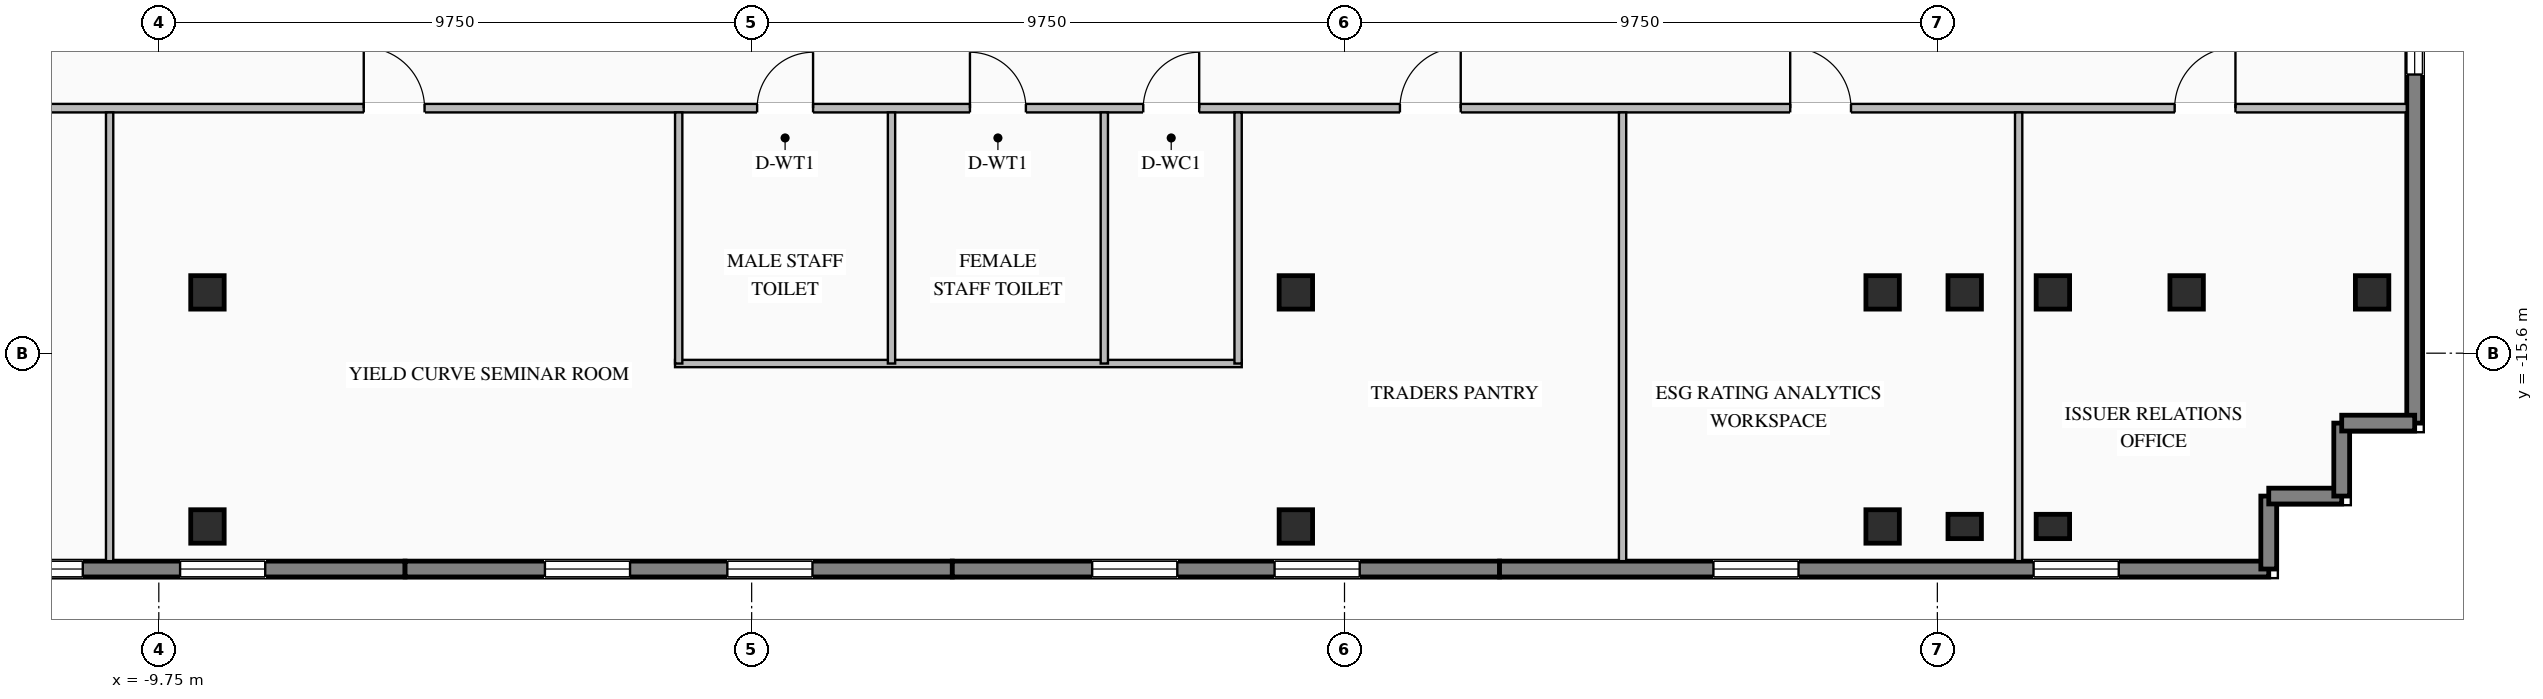
"""IFC4 building model, lengths in metres.
Left out: names, types, materials, properties, quantities, classifications, styles, units other than length and angle.
Written with IfcOpenShell. Run it as: python <this file> out.ifc"""

import sys

from ifc_helpers import new_model, si_unit, direction, frame, frame_2d, origin, origin_2d, place, context, subcontext, project, spatial, rectangle, i_section, extrude, element, fill, save


model = new_model("IFC4")
c1 = context("Model", 3, precision=1e-05, world=origin(), true_north=direction((0.0, 1.0)))
c2 = subcontext(c1, "Body", "Model", "MODEL_VIEW")
j1 = project(units=[si_unit("LENGTHUNIT", "METRE"), si_unit("PLANEANGLEUNIT", "RADIAN")], contexts=[c1])
p1 = place(None, origin())
s1 = spatial("IfcSite", under=j1, at=p1, CompositionType="ELEMENT")
p2 = place(p1, origin())
s2 = spatial("IfcBuilding", under=s1, at=p2, CompositionType="ELEMENT")
p3 = place(p2, frame((0.0, 0.0, 236.1)))
s3 = spatial("IfcBuildingStorey", under=s2, at=p3, CompositionType="ELEMENT", Elevation=236.1)
for number, where, z_axis, x_axis in (
    (1, (-8.95, -14.6, 0.0), (0.0, 0.0, 1.0), (1.0, 0.0, 0.0)),
    (2, (8.95, -14.6, 0.0), (0.0, 0.0, 1.0), (1.0, 0.0, 0.0)),
    (3, (18.6, -14.6, 0.0), (0.0, 0.0, 1.0), (1.0, 0.0, 0.0)),
    (4, (19.95, -14.6, 0.0), (0.0, 0.0, 1.0), (1.0, 0.0, 0.0)),
    (5, (21.4, -14.6, 0.0), (0.0, 0.0, 1.0), (1.0, 0.0, 0.0)),
    (6, (23.6, -14.6, 0.0), (0.0, 0.0, 1.0), (1.0, 0.0, 0.0)),
    (7, (-8.95, -18.45, 0.0), (0.0, 0.0, 1.0), (1.0, 0.0, 0.0)),
    (8, (8.95, -18.45, 0.0), (0.0, 0.0, 1.0), (1.0, 0.0, 0.0)),
    (9, (18.6, -18.45, 0.0), (0.0, 0.0, 1.0), (1.0, 0.0, 0.0)),
    (10, (26.65, -14.6, 0.0), (0.0, 0.0, 1.0), (1.0, 0.0, 0.0)),
):
    element("IfcColumn", number, at=place(p3, frame(where, z_axis=z_axis, x_axis=x_axis)), inside=s3, PredefinedType="COLUMN", context=c2, shape_type="SweptSolid", body=[
        extrude(i_section(OverallWidth=0.55, OverallDepth=0.55, WebThickness=0.024, FlangeThickness=0.036, at=origin_2d()), origin(), (0.0, 0.0, 1.0), 3.45),
    ])
for number, where, z_axis, x_axis in (
    (11, (19.95, -18.45, 0.0), (0.0, 0.0, 1.0), (1.0, 0.0, 0.0)),
    (12, (21.4, -18.45, 0.0), (0.0, 0.0, 1.0), (1.0, 0.0, 0.0)),
):
    element("IfcColumn", number, at=place(p3, frame(where, z_axis=z_axis, x_axis=x_axis)), inside=s3, PredefinedType="PILASTER", context=c2, shape_type="SweptSolid", body=[
        extrude(rectangle(XDim=0.55, YDim=0.4, at=origin_2d()), origin(), (0.0, 0.0, 1.0), 3.45),
    ])
p4 = place(p3, frame((-5.7, -19.15, 0.0), z_axis=(0.0, 0.0, 1.0), x_axis=(-1.0, 0.0, 0.0)))
e13 = element("IfcWall", 13, at=p4, inside=s3, PredefinedType="STANDARD", context=c2, shape_type="SweptSolid", body=[
    extrude(rectangle(XDim=9.0, YDim=0.26, at=frame_2d((4.5, 0.0))), origin(), (0.0, 0.0, 1.0), 3.25),
])
p5 = place(p4, frame((2.3, 0.0, 0.76)))
e14 = element("IfcOpeningElement", 14, at=p5, cuts=e13, PredefinedType="OPENING", context=c2, shape_type="SweptSolid", body=[
    extrude(rectangle(XDim=1.4, YDim=1.95, at=frame_2d((0.7, 0.975))), frame((0.0, 0.14, 0.0), z_axis=(0.0, -1.0, 0.0), x_axis=(1.0, 0.0, 0.0)), (0.0, 0.0, 1.0), 0.28),
])
p6 = place(p4, frame((5.3, 0.0, 0.76)))
e15 = element("IfcOpeningElement", 15, at=p6, cuts=e13, PredefinedType="OPENING", context=c2, shape_type="SweptSolid", body=[
    extrude(rectangle(XDim=1.4, YDim=1.95, at=frame_2d((0.7, 0.975))), frame((0.0, 0.14, 0.0), z_axis=(0.0, -1.0, 0.0), x_axis=(1.0, 0.0, 0.0)), (0.0, 0.0, 1.0), 0.28),
])
p7 = place(p3, frame((3.3, -19.15, 0.0), z_axis=(0.0, 0.0, 1.0), x_axis=(-1.0, 0.0, 0.0)))
e16 = element("IfcWall", 16, at=p7, inside=s3, PredefinedType="STANDARD", context=c2, shape_type="SweptSolid", body=[
    extrude(rectangle(XDim=9.0, YDim=0.26, at=frame_2d((4.5, 0.0))), origin(), (0.0, 0.0, 1.0), 3.25),
])
p8 = place(p7, frame((2.3, 0.0, 0.76)))
e17 = element("IfcOpeningElement", 17, at=p8, cuts=e16, PredefinedType="OPENING", context=c2, shape_type="SweptSolid", body=[
    extrude(rectangle(XDim=1.4, YDim=1.95, at=frame_2d((0.7, 0.975))), frame((0.0, 0.14, 0.0), z_axis=(0.0, -1.0, 0.0), x_axis=(1.0, 0.0, 0.0)), (0.0, 0.0, 1.0), 0.28),
])
p9 = place(p7, frame((5.3, 0.0, 0.76)))
e18 = element("IfcOpeningElement", 18, at=p9, cuts=e16, PredefinedType="OPENING", context=c2, shape_type="SweptSolid", body=[
    extrude(rectangle(XDim=1.4, YDim=1.95, at=frame_2d((0.7, 0.975))), frame((0.0, 0.14, 0.0), z_axis=(0.0, -1.0, 0.0), x_axis=(1.0, 0.0, 0.0)), (0.0, 0.0, 1.0), 0.28),
])
p10 = place(p3, frame((12.3, -19.15, 0.0), z_axis=(0.0, 0.0, 1.0), x_axis=(-1.0, 0.0, 0.0)))
e19 = element("IfcWall", 19, at=p10, inside=s3, PredefinedType="STANDARD", context=c2, shape_type="SweptSolid", body=[
    extrude(rectangle(XDim=9.0, YDim=0.26, at=frame_2d((4.5, 0.0))), origin(), (0.0, 0.0, 1.0), 3.25),
])
p11 = place(p10, frame((2.3, 0.0, 0.76)))
e20 = element("IfcOpeningElement", 20, at=p11, cuts=e19, PredefinedType="OPENING", context=c2, shape_type="SweptSolid", body=[
    extrude(rectangle(XDim=1.4, YDim=1.95, at=frame_2d((0.7, 0.975))), frame((0.0, 0.14, 0.0), z_axis=(0.0, -1.0, 0.0), x_axis=(1.0, 0.0, 0.0)), (0.0, 0.0, 1.0), 0.28),
])
p12 = place(p10, frame((5.3, 0.0, 0.76)))
e21 = element("IfcOpeningElement", 21, at=p12, cuts=e19, PredefinedType="OPENING", context=c2, shape_type="SweptSolid", body=[
    extrude(rectangle(XDim=1.4, YDim=1.95, at=frame_2d((0.7, 0.975))), frame((0.0, 0.14, 0.0), z_axis=(0.0, -1.0, 0.0), x_axis=(1.0, 0.0, 0.0)), (0.0, 0.0, 1.0), 0.28),
])
p13 = place(p3, frame((24.95, -19.15, 0.0), z_axis=(0.0, 0.0, 1.0), x_axis=(-1.0, 0.0, 0.0)))
e22 = element("IfcWall", 22, at=p13, inside=s3, PredefinedType="STANDARD", context=c2, shape_type="SweptSolid", body=[
    extrude(rectangle(XDim=12.65, YDim=0.26, at=frame_2d((6.325, 0.0))), origin(), (0.0, 0.0, 1.0), 3.25),
])
p14 = place(p13, frame((2.467, 0.0, 0.76)))
e23 = element("IfcOpeningElement", 23, at=p14, cuts=e22, PredefinedType="OPENING", context=c2, shape_type="SweptSolid", body=[
    extrude(rectangle(XDim=1.4, YDim=1.95, at=frame_2d((0.7, 0.975))), frame((0.0, 0.14, 0.0), z_axis=(0.0, -1.0, 0.0), x_axis=(1.0, 0.0, 0.0)), (0.0, 0.0, 1.0), 0.28),
])
p15 = place(p13, frame((7.733, 0.0, 0.76)))
e24 = element("IfcOpeningElement", 24, at=p15, cuts=e22, PredefinedType="OPENING", context=c2, shape_type="SweptSolid", body=[
    extrude(rectangle(XDim=1.4, YDim=1.95, at=frame_2d((0.7, 0.975))), frame((0.0, 0.14, 0.0), z_axis=(0.0, -1.0, 0.0), x_axis=(1.0, 0.0, 0.0)), (0.0, 0.0, 1.0), 0.28),
])
p16 = place(p3, frame((27.35, -0.9, 0.0), z_axis=(0.0, 0.0, 1.0), x_axis=(0.0, -1.0, 0.0)))
e25 = element("IfcWall", 25, at=p16, inside=s3, PredefinedType="STANDARD", context=c2, shape_type="SweptSolid", body=[
    extrude(rectangle(XDim=15.85, YDim=0.26, at=frame_2d((7.925, 0.0))), origin(), (0.0, 0.0, 1.0), 3.25),
])
p17 = place(p16, frame((4.683, 0.0, 0.76)))
e26 = element("IfcOpeningElement", 26, at=p17, cuts=e25, PredefinedType="OPENING", context=c2, shape_type="SweptSolid", body=[
    extrude(rectangle(XDim=1.2, YDim=1.95, at=frame_2d((0.6, 0.975))), frame((0.0, 0.14, 0.0), z_axis=(0.0, -1.0, 0.0), x_axis=(1.0, 0.0, 0.0)), (0.0, 0.0, 1.0), 0.28),
])
p18 = place(p16, frame((8.917, 0.0, 0.76)))
e27 = element("IfcOpeningElement", 27, at=p18, cuts=e25, PredefinedType="OPENING", context=c2, shape_type="SweptSolid", body=[
    extrude(rectangle(XDim=1.2, YDim=1.95, at=frame_2d((0.6, 0.975))), frame((0.0, 0.14, 0.0), z_axis=(0.0, -1.0, 0.0), x_axis=(1.0, 0.0, 0.0)), (0.0, 0.0, 1.0), 0.28),
])
for number, where, z_axis, x_axis in (
    (28, (24.95, -19.15, 0.0), (0.0, 0.0, 1.0), (0.0, 1.0, 0.0)),
    (29, (24.95, -17.95, 0.0), (0.0, 0.0, 1.0), (1.0, 0.0, 0.0)),
    (30, (26.15, -17.95, 0.0), (0.0, 0.0, 1.0), (0.0, 1.0, 0.0)),
):
    element("IfcWall", number, at=place(p3, frame(where, z_axis=z_axis, x_axis=x_axis)), inside=s3, PredefinedType="STANDARD", context=c2, shape_type="SweptSolid", body=[
        extrude(rectangle(XDim=1.2, YDim=0.26, at=frame_2d((0.6, 0.0))), origin(), (0.0, 0.0, 1.0), 3.25),
    ])
p19 = place(p3, frame((26.15, -16.75, 0.0), z_axis=(0.0, 0.0, 1.0), x_axis=(1.0, 0.0, 0.0)))
e31 = element("IfcWall", 31, at=p19, inside=s3, PredefinedType="STANDARD", context=c2, shape_type="SweptSolid", body=[
    extrude(rectangle(XDim=1.2, YDim=0.26, at=frame_2d((0.6, 0.0))), origin(), (0.0, 0.0, 1.0), 3.25),
])
p20 = place(p3, frame((-29.62, -11.57, 0.0), z_axis=(0.0, 0.0, 1.0), x_axis=(1.0, 0.0, 0.0)))
e32 = element("IfcWall", 32, at=p20, inside=s3, PredefinedType="STANDARD", context=c2, shape_type="SweptSolid", body=[
    extrude(rectangle(XDim=56.84, YDim=0.14, at=frame_2d((28.42, 0.0))), origin(), (0.0, 0.0, 1.0), 3.25),
])
p21 = place(p20, frame((29.71, 0.0, 0.0)))
e33 = element("IfcOpeningElement", 33, at=p21, cuts=e32, PredefinedType="OPENING", context=c2, shape_type="SweptSolid", body=[
    extrude(rectangle(XDim=0.92, YDim=2.08, at=frame_2d((0.46, 1.04))), frame((0.0, 0.08, 0.0), z_axis=(0.0, -1.0, 0.0), x_axis=(1.0, 0.0, 0.0)), (0.0, 0.0, 1.0), 0.16),
])
p22 = place(p20, frame((33.21, 0.0, 0.0)))
e34 = element("IfcOpeningElement", 34, at=p22, cuts=e32, PredefinedType="OPENING", context=c2, shape_type="SweptSolid", body=[
    extrude(rectangle(XDim=0.92, YDim=2.08, at=frame_2d((0.46, 1.04))), frame((0.0, 0.08, 0.0), z_axis=(0.0, -1.0, 0.0), x_axis=(1.0, 0.0, 0.0)), (0.0, 0.0, 1.0), 0.16),
])
p23 = place(p20, frame((36.06, 0.0, 0.0)))
e35 = element("IfcOpeningElement", 35, at=p23, cuts=e32, PredefinedType="OPENING", context=c2, shape_type="SweptSolid", body=[
    extrude(rectangle(XDim=0.92, YDim=2.08, at=frame_2d((0.46, 1.04))), frame((0.0, 0.08, 0.0), z_axis=(0.0, -1.0, 0.0), x_axis=(1.0, 0.0, 0.0)), (0.0, 0.0, 1.0), 0.16),
])
p24 = place(p20, frame((4.335, 0.0, 0.0)))
e36 = element("IfcOpeningElement", 36, at=p24, cuts=e32, PredefinedType="OPENING", context=c2, shape_type="SweptSolid", body=[
    extrude(rectangle(XDim=1.0, YDim=2.08, at=frame_2d((0.5, 1.04))), frame((0.0, 0.08, 0.0), z_axis=(0.0, -1.0, 0.0), x_axis=(1.0, 0.0, 0.0)), (0.0, 0.0, 1.0), 0.16),
])
p25 = place(p20, frame((13.74, 0.0, 0.0)))
e37 = element("IfcOpeningElement", 37, at=p25, cuts=e32, PredefinedType="OPENING", context=c2, shape_type="SweptSolid", body=[
    extrude(rectangle(XDim=1.0, YDim=2.08, at=frame_2d((0.5, 1.04))), frame((0.0, 0.08, 0.0), z_axis=(0.0, -1.0, 0.0), x_axis=(1.0, 0.0, 0.0)), (0.0, 0.0, 1.0), 0.16),
])
p26 = place(p20, frame((23.24, 0.0, 0.0)))
e38 = element("IfcOpeningElement", 38, at=p26, cuts=e32, PredefinedType="OPENING", context=c2, shape_type="SweptSolid", body=[
    extrude(rectangle(XDim=1.0, YDim=2.08, at=frame_2d((0.5, 1.04))), frame((0.0, 0.08, 0.0), z_axis=(0.0, -1.0, 0.0), x_axis=(1.0, 0.0, 0.0)), (0.0, 0.0, 1.0), 0.16),
])
p27 = place(p20, frame((40.281, 0.0, 0.0)))
e39 = element("IfcOpeningElement", 39, at=p27, cuts=e32, PredefinedType="OPENING", context=c2, shape_type="SweptSolid", body=[
    extrude(rectangle(XDim=1.0, YDim=2.08, at=frame_2d((0.5, 1.04))), frame((0.0, 0.08, 0.0), z_axis=(0.0, -1.0, 0.0), x_axis=(1.0, 0.0, 0.0)), (0.0, 0.0, 1.0), 0.16),
])
p28 = place(p20, frame((46.7, 0.0, 0.0)))
e40 = element("IfcOpeningElement", 40, at=p28, cuts=e32, PredefinedType="OPENING", context=c2, shape_type="SweptSolid", body=[
    extrude(rectangle(XDim=1.0, YDim=2.08, at=frame_2d((0.5, 1.04))), frame((0.0, 0.08, 0.0), z_axis=(0.0, -1.0, 0.0), x_axis=(1.0, 0.0, 0.0)), (0.0, 0.0, 1.0), 0.16),
])
p29 = place(p20, frame((53.022, 0.0, 0.0)))
e41 = element("IfcOpeningElement", 41, at=p29, cuts=e32, PredefinedType="OPENING", context=c2, shape_type="SweptSolid", body=[
    extrude(rectangle(XDim=1.0, YDim=2.08, at=frame_2d((0.5, 1.04))), frame((0.0, 0.08, 0.0), z_axis=(0.0, -1.0, 0.0), x_axis=(1.0, 0.0, 0.0)), (0.0, 0.0, 1.0), 0.16),
])
p30 = place(p3, frame((-1.26, -15.77, 0.0), z_axis=(0.0, 0.0, 1.0), x_axis=(1.0, 0.0, 0.0)))
e42 = element("IfcWall", 42, at=p30, inside=s3, PredefinedType="STANDARD", context=c2, shape_type="SweptSolid", body=[
    extrude(rectangle(XDim=9.32, YDim=0.12, at=frame_2d((4.66, 0.0))), origin(), (0.0, 0.0, 1.0), 3.25),
])
for number, where, z_axis, x_axis in (
    (43, (-1.2, -15.77, 0.0), (0.0, 0.0, 1.0), (0.0, 1.0, 0.0)),
    (44, (2.3, -15.77, 0.0), (0.0, 0.0, 1.0), (0.0, 1.0, 0.0)),
    (45, (5.8, -15.77, 0.0), (0.0, 0.0, 1.0), (0.0, 1.0, 0.0)),
    (46, (8.0, -15.77, 0.0), (0.0, 0.0, 1.0), (0.0, 1.0, 0.0)),
):
    element("IfcWall", number, at=place(p3, frame(where, z_axis=z_axis, x_axis=x_axis)), inside=s3, PredefinedType="STANDARD", context=c2, shape_type="SweptSolid", body=[
        extrude(rectangle(XDim=4.13, YDim=0.12, at=frame_2d((2.065, 0.0))), origin(), (0.0, 0.0, 1.0), 3.25),
    ])
for number, where, z_axis, x_axis in (
    (47, (-10.559, -19.02, 0.0), (0.0, 0.0, 1.0), (0.0, 1.0, 0.0)),
    (48, (14.323, -19.02, 0.0), (0.0, 0.0, 1.0), (0.0, 1.0, 0.0)),
    (49, (20.837, -19.02, 0.0), (0.0, 0.0, 1.0), (0.0, 1.0, 0.0)),
):
    element("IfcWall", number, at=place(p3, frame(where, z_axis=z_axis, x_axis=x_axis)), inside=s3, PredefinedType="STANDARD", context=c2, shape_type="SweptSolid", body=[
        extrude(rectangle(XDim=7.38, YDim=0.12, at=frame_2d((3.69, 0.0))), origin(), (0.0, 0.0, 1.0), 3.25),
    ])
p31 = place(p5, origin())
e50 = element("IfcWindow", 50, at=p31, inside=s3, PartitioningType="SINGLE_PANEL", PredefinedType="WINDOW", context=c2, shape_type="SweptSolid", body=[
    extrude(rectangle(XDim=1.4, YDim=1.95, at=frame_2d((0.7, 0.975))), frame((0.0, 0.03, 0.0), z_axis=(0.0, -1.0, 0.0), x_axis=(1.0, 0.0, 0.0)), (0.0, 0.0, 1.0), 0.06),
])
fill(e14, e50)
p32 = place(p6, origin())
e51 = element("IfcWindow", 51, at=p32, inside=s3, PartitioningType="SINGLE_PANEL", PredefinedType="WINDOW", context=c2, shape_type="SweptSolid", body=[
    extrude(rectangle(XDim=1.4, YDim=1.95, at=frame_2d((0.7, 0.975))), frame((0.0, 0.03, 0.0), z_axis=(0.0, -1.0, 0.0), x_axis=(1.0, 0.0, 0.0)), (0.0, 0.0, 1.0), 0.06),
])
fill(e15, e51)
p33 = place(p8, origin())
e52 = element("IfcWindow", 52, at=p33, inside=s3, PartitioningType="SINGLE_PANEL", PredefinedType="WINDOW", context=c2, shape_type="SweptSolid", body=[
    extrude(rectangle(XDim=1.4, YDim=1.95, at=frame_2d((0.7, 0.975))), frame((0.0, 0.03, 0.0), z_axis=(0.0, -1.0, 0.0), x_axis=(1.0, 0.0, 0.0)), (0.0, 0.0, 1.0), 0.06),
])
fill(e17, e52)
p34 = place(p9, origin())
e53 = element("IfcWindow", 53, at=p34, inside=s3, PartitioningType="SINGLE_PANEL", PredefinedType="WINDOW", context=c2, shape_type="SweptSolid", body=[
    extrude(rectangle(XDim=1.4, YDim=1.95, at=frame_2d((0.7, 0.975))), frame((0.0, 0.03, 0.0), z_axis=(0.0, -1.0, 0.0), x_axis=(1.0, 0.0, 0.0)), (0.0, 0.0, 1.0), 0.06),
])
fill(e18, e53)
p35 = place(p11, origin())
e54 = element("IfcWindow", 54, at=p35, inside=s3, PartitioningType="SINGLE_PANEL", PredefinedType="WINDOW", context=c2, shape_type="SweptSolid", body=[
    extrude(rectangle(XDim=1.4, YDim=1.95, at=frame_2d((0.7, 0.975))), frame((0.0, 0.03, 0.0), z_axis=(0.0, -1.0, 0.0), x_axis=(1.0, 0.0, 0.0)), (0.0, 0.0, 1.0), 0.06),
])
fill(e20, e54)
p36 = place(p12, origin())
e55 = element("IfcWindow", 55, at=p36, inside=s3, PartitioningType="SINGLE_PANEL", PredefinedType="WINDOW", context=c2, shape_type="SweptSolid", body=[
    extrude(rectangle(XDim=1.4, YDim=1.95, at=frame_2d((0.7, 0.975))), frame((0.0, 0.03, 0.0), z_axis=(0.0, -1.0, 0.0), x_axis=(1.0, 0.0, 0.0)), (0.0, 0.0, 1.0), 0.06),
])
fill(e21, e55)
p37 = place(p14, origin())
e56 = element("IfcWindow", 56, at=p37, inside=s3, PartitioningType="SINGLE_PANEL", PredefinedType="WINDOW", context=c2, shape_type="SweptSolid", body=[
    extrude(rectangle(XDim=1.4, YDim=1.95, at=frame_2d((0.7, 0.975))), frame((0.0, 0.03, 0.0), z_axis=(0.0, -1.0, 0.0), x_axis=(1.0, 0.0, 0.0)), (0.0, 0.0, 1.0), 0.06),
])
fill(e23, e56)
p38 = place(p15, origin())
e57 = element("IfcWindow", 57, at=p38, inside=s3, PartitioningType="SINGLE_PANEL", PredefinedType="WINDOW", context=c2, shape_type="SweptSolid", body=[
    extrude(rectangle(XDim=1.4, YDim=1.95, at=frame_2d((0.7, 0.975))), frame((0.0, 0.03, 0.0), z_axis=(0.0, -1.0, 0.0), x_axis=(1.0, 0.0, 0.0)), (0.0, 0.0, 1.0), 0.06),
])
fill(e24, e57)
p39 = place(p18, origin())
e58 = element("IfcWindow", 58, at=p39, inside=s3, PartitioningType="SINGLE_PANEL", PredefinedType="WINDOW", context=c2, shape_type="SweptSolid", body=[
    extrude(rectangle(XDim=1.2, YDim=1.95, at=frame_2d((0.6, 0.975))), frame((0.0, 0.03, 0.0), z_axis=(0.0, -1.0, 0.0), x_axis=(1.0, 0.0, 0.0)), (0.0, 0.0, 1.0), 0.06),
])
fill(e27, e58)
p40 = place(p21, origin())
e59 = element("IfcDoor", 59, at=p40, inside=s3, OperationType="SINGLE_SWING_RIGHT", PredefinedType="DOOR", context=c2, shape_type="SweptSolid", body=[
    extrude(rectangle(XDim=0.92, YDim=2.08, at=frame_2d((0.46, 1.04))), frame((0.0, 0.025, 0.0), z_axis=(0.0, -1.0, 0.0), x_axis=(1.0, 0.0, 0.0)), (0.0, 0.0, 1.0), 0.05),
])
fill(e33, e59)
p41 = place(p22, origin())
e60 = element("IfcDoor", 60, at=p41, inside=s3, OperationType="SINGLE_SWING_LEFT", PredefinedType="DOOR", context=c2, shape_type="SweptSolid", body=[
    extrude(rectangle(XDim=0.92, YDim=2.08, at=frame_2d((0.46, 1.04))), frame((0.0, 0.025, 0.0), z_axis=(0.0, -1.0, 0.0), x_axis=(1.0, 0.0, 0.0)), (0.0, 0.0, 1.0), 0.05),
])
fill(e34, e60)
p42 = place(p23, origin())
e61 = element("IfcDoor", 61, at=p42, inside=s3, OperationType="SINGLE_SWING_RIGHT", PredefinedType="DOOR", context=c2, shape_type="SweptSolid", body=[
    extrude(rectangle(XDim=0.92, YDim=2.08, at=frame_2d((0.46, 1.04))), frame((0.0, 0.025, 0.0), z_axis=(0.0, -1.0, 0.0), x_axis=(1.0, 0.0, 0.0)), (0.0, 0.0, 1.0), 0.05),
])
fill(e35, e61)
p43 = place(p26, origin())
e62 = element("IfcDoor", 62, at=p43, inside=s3, OperationType="SINGLE_SWING_LEFT", PredefinedType="DOOR", context=c2, shape_type="SweptSolid", body=[
    extrude(rectangle(XDim=1.0, YDim=2.08, at=frame_2d((0.5, 1.04))), frame((0.0, 0.025, 0.0), z_axis=(0.0, -1.0, 0.0), x_axis=(1.0, 0.0, 0.0)), (0.0, 0.0, 1.0), 0.05),
])
fill(e38, e62)
p44 = place(p27, origin())
e63 = element("IfcDoor", 63, at=p44, inside=s3, OperationType="SINGLE_SWING_RIGHT", PredefinedType="DOOR", context=c2, shape_type="SweptSolid", body=[
    extrude(rectangle(XDim=1.0, YDim=2.08, at=frame_2d((0.5, 1.04))), frame((0.0, 0.025, 0.0), z_axis=(0.0, -1.0, 0.0), x_axis=(1.0, 0.0, 0.0)), (0.0, 0.0, 1.0), 0.05),
])
fill(e39, e63)
p45 = place(p28, origin())
e64 = element("IfcDoor", 64, at=p45, inside=s3, OperationType="SINGLE_SWING_LEFT", PredefinedType="DOOR", context=c2, shape_type="SweptSolid", body=[
    extrude(rectangle(XDim=1.0, YDim=2.08, at=frame_2d((0.5, 1.04))), frame((0.0, 0.025, 0.0), z_axis=(0.0, -1.0, 0.0), x_axis=(1.0, 0.0, 0.0)), (0.0, 0.0, 1.0), 0.05),
])
fill(e40, e64)
p46 = place(p29, origin())
e65 = element("IfcDoor", 65, at=p46, inside=s3, OperationType="SINGLE_SWING_RIGHT", PredefinedType="DOOR", context=c2, shape_type="SweptSolid", body=[
    extrude(rectangle(XDim=1.0, YDim=2.08, at=frame_2d((0.5, 1.04))), frame((0.0, 0.025, 0.0), z_axis=(0.0, -1.0, 0.0), x_axis=(1.0, 0.0, 0.0)), (0.0, 0.0, 1.0), 0.05),
])
fill(e41, e65)
save(model, sys.argv[1])
